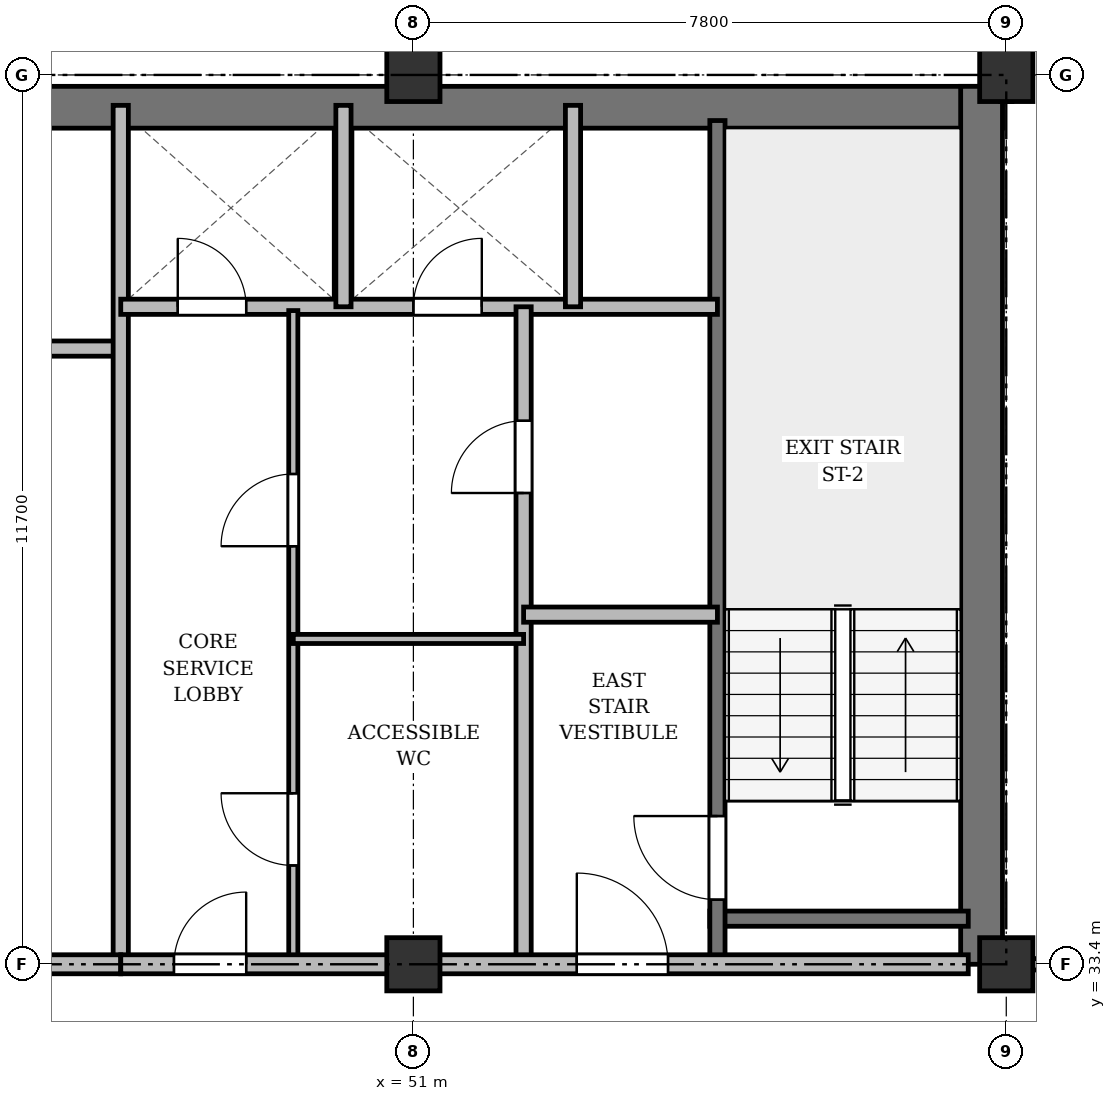
"""IFC4 building model, lengths in metres.
Left out: names, types, materials, properties, quantities, classifications, styles, units other than length and angle.
Written with IfcOpenShell. Run it as: python <this file> out.ifc"""

import sys

from ifc_helpers import new_model, si_unit, direction, frame, frame_2d, origin, origin_2d, place, context, subcontext, project, spatial, rectangle, extrude, source, transform, mapped, element, fill, save


model = new_model("IFC4")
c1 = context("Model", 3, precision=1e-05, world=origin(), true_north=direction((0.0, 1.0)))
c2 = subcontext(c1, "Body", "Model", "MODEL_VIEW")
j1 = project(units=[si_unit("LENGTHUNIT", "METRE"), si_unit("PLANEANGLEUNIT", "RADIAN")], contexts=[c1])
p1 = place(None, origin())
s1 = spatial("IfcSite", under=j1, at=p1, CompositionType="ELEMENT")
p2 = place(p1, origin())
s2 = spatial("IfcBuilding", under=s1, at=p2, CompositionType="ELEMENT")
p3 = place(p2, frame((0.0, 0.0, 201.3)))
s3 = spatial("IfcBuildingStorey", under=s2, at=p3, CompositionType="ELEMENT", Elevation=201.3)
m1 = source(origin(), c2, "Body", "SweptSolid", [
    extrude(rectangle(XDim=0.7, YDim=0.7, at=origin_2d()), origin(), (0.0, 0.0, 1.0), 3.6),
])
for number, where, z_axis, x_axis in (
    (1, (51.0, 33.4, 0.0), (0.0, 0.0, 1.0), (1.0, 0.0, 0.0)),
    (2, (51.0, 45.1, 0.0), (0.0, 0.0, 1.0), (1.0, 0.0, 0.0)),
    (3, (58.8, 33.4, 0.0), (0.0, 0.0, 1.0), (1.0, 0.0, 0.0)),
    (4, (58.8, 45.1, 0.0), (0.0, 0.0, 1.0), (1.0, 0.0, 0.0)),
):
    element("IfcColumn", number, at=place(p3, frame(where, z_axis=z_axis, x_axis=x_axis)), inside=s3, PredefinedType="COLUMN", context=c2, shape_type="MappedRepresentation", body=[
        mapped(m1, transform((0.0, 0.0, 0.0), x_axis=(1.0, 0.0, 0.0), y_axis=(0.0, 1.0, 0.0), z_axis=(0.0, 0.0, 1.0), scale=1.0)),
    ])
p4 = place(p3, frame((15.65, 44.675, 0.0), z_axis=(0.0, 0.0, 1.0), x_axis=(1.0, 0.0, 0.0)))
e5 = element("IfcWall", 5, at=p4, inside=s3, PredefinedType="SHEAR", context=c2, shape_type="SweptSolid", body=[
    extrude(rectangle(XDim=43.1, YDim=0.55, at=frame_2d((21.55, 0.0))), origin(), (0.0, 0.0, 1.0), 3.22),
])
p5 = place(p3, frame((58.475, 33.4, 0.0), z_axis=(0.0, 0.0, 1.0), x_axis=(0.0, 1.0, 0.0)))
e6 = element("IfcWall", 6, at=p5, inside=s3, PredefinedType="SHEAR", context=c2, shape_type="SweptSolid", body=[
    extrude(rectangle(XDim=11.55, YDim=0.55, at=frame_2d((5.775, 0.0))), origin(), (0.0, 0.0, 1.0), 3.22),
])
p6 = place(p3, frame((54.9, 34.0, 0.0), z_axis=(0.0, 0.0, 1.0), x_axis=(1.0, 0.0, 0.0)))
e7 = element("IfcWall", 7, at=p6, inside=s3, PredefinedType="SHEAR", context=c2, shape_type="SweptSolid", body=[
    extrude(rectangle(XDim=3.4, YDim=0.2, at=frame_2d((1.7, 0.0))), origin(), (0.0, 0.0, 1.0), 3.22),
])
p7 = place(p3, frame((55.0, 33.4, 0.0), z_axis=(0.0, 0.0, 1.0), x_axis=(0.0, 1.0, 0.0)))
e8 = element("IfcWall", 8, at=p7, inside=s3, PredefinedType="SHEAR", context=c2, shape_type="SweptSolid", body=[
    extrude(rectangle(XDim=11.1, YDim=0.2, at=frame_2d((5.55, 0.0))), origin(), (0.0, 0.0, 1.0), 3.22),
])
p8 = place(p7, frame((0.85, 0.0, 0.0)))
e9 = element("IfcOpeningElement", 9, at=p8, cuts=e8, PredefinedType="OPENING", context=c2, shape_type="SweptSolid", body=[
    extrude(rectangle(XDim=1.1, YDim=2.15, at=frame_2d((0.55, 1.075))), frame((0.0, 0.11, 0.0), z_axis=(0.0, -1.0, 0.0), x_axis=(1.0, 0.0, 0.0)), (0.0, 0.0, 1.0), 0.22),
])
p9 = place(p3, frame((40.25, 41.5, 0.0), z_axis=(0.0, 0.0, 1.0), x_axis=(1.0, 0.0, 0.0)))
e10 = element("IfcWall", 10, at=p9, inside=s3, PredefinedType="SOLIDWALL", context=c2, shape_type="SweptSolid", body=[
    extrude(rectangle(XDim=6.9, YDim=0.2, at=frame_2d((3.45, 0.0))), origin(), (0.0, 0.0, 1.0), 2.72),
])
p10 = place(p3, frame((47.15, 33.4, 0.0), z_axis=(0.0, 0.0, 1.0), x_axis=(0.0, 1.0, 0.0)))
e11 = element("IfcWall", 11, at=p10, inside=s3, PredefinedType="SOLIDWALL", context=c2, shape_type="SweptSolid", body=[
    extrude(rectangle(XDim=11.3, YDim=0.2, at=frame_2d((5.65, 0.0))), origin(), (0.0, 0.0, 1.0), 2.77),
])
p11 = place(p3, frame((33.3, 33.4, 0.0), z_axis=(0.0, 0.0, 1.0), x_axis=(1.0, 0.0, 0.0)))
e12 = element("IfcWall", 12, at=p11, inside=s3, PredefinedType="PARTITIONING", context=c2, shape_type="SweptSolid", body=[
    extrude(rectangle(XDim=13.85, YDim=0.25, at=frame_2d((6.925, 0.0))), origin(), (0.0, 0.0, 1.0), 2.77),
])
p12 = place(p11, frame((4.2, 0.0, 0.0)))
e13 = element("IfcOpeningElement", 13, at=p12, cuts=e12, PredefinedType="OPENING", context=c2, shape_type="SweptSolid", body=[
    extrude(rectangle(XDim=1.6, YDim=2.2, at=frame_2d((0.8, 1.1))), frame((0.0, 0.135, 0.0), z_axis=(0.0, -1.0, 0.0), x_axis=(1.0, 0.0, 0.0)), (0.0, 0.0, 1.0), 0.27),
])
p13 = place(p3, frame((47.15, 42.05, 0.0), z_axis=(0.0, 0.0, 1.0), x_axis=(1.0, 0.0, 0.0)))
e14 = element("IfcWall", 14, at=p13, inside=s3, PredefinedType="SOLIDWALL", context=c2, shape_type="SweptSolid", body=[
    extrude(rectangle(XDim=7.85, YDim=0.2, at=frame_2d((3.925, 0.0))), origin(), (0.0, 0.0, 1.0), 2.72),
])
p14 = place(p13, frame((0.75, 0.0, 0.0)))
e15 = element("IfcOpeningElement", 15, at=p14, cuts=e14, PredefinedType="OPENING", context=c2, shape_type="SweptSolid", body=[
    extrude(rectangle(XDim=0.9, YDim=2.1, at=frame_2d((0.45, 1.05))), frame((0.0, 0.11, 0.0), z_axis=(0.0, -1.0, 0.0), x_axis=(1.0, 0.0, 0.0)), (0.0, 0.0, 1.0), 0.22),
])
p15 = place(p13, frame((3.85, 0.0, 0.0)))
e16 = element("IfcOpeningElement", 16, at=p15, cuts=e14, PredefinedType="OPENING", context=c2, shape_type="SweptSolid", body=[
    extrude(rectangle(XDim=0.9, YDim=2.1, at=frame_2d((0.45, 1.05))), frame((0.0, 0.11, 0.0), z_axis=(0.0, -1.0, 0.0), x_axis=(1.0, 0.0, 0.0)), (0.0, 0.0, 1.0), 0.22),
])
for number, where, z_axis, x_axis in (
    (17, (50.08, 42.05, 0.0), (0.0, 0.0, 1.0), (0.0, 1.0, 0.0)),
    (18, (53.1, 42.05, 0.0), (0.0, 0.0, 1.0), (0.0, 1.0, 0.0)),
):
    element("IfcWall", number, at=place(p3, frame(where, z_axis=z_axis, x_axis=x_axis)), inside=s3, PredefinedType="SOLIDWALL", context=c2, shape_type="SweptSolid", body=[
        extrude(rectangle(XDim=2.65, YDim=0.2, at=frame_2d((1.325, 0.0))), origin(), (0.0, 0.0, 1.0), 3.22),
    ])
p16 = place(p3, frame((52.45, 33.4, 0.0), z_axis=(0.0, 0.0, 1.0), x_axis=(0.0, 1.0, 0.0)))
e19 = element("IfcWall", 19, at=p16, inside=s3, PredefinedType="PARTITIONING", context=c2, shape_type="SweptSolid", body=[
    extrude(rectangle(XDim=8.65, YDim=0.2, at=frame_2d((4.325, 0.0))), origin(), (0.0, 0.0, 1.0), 2.77),
])
p17 = place(p16, frame((6.2, 0.0, 0.0)))
e20 = element("IfcOpeningElement", 20, at=p17, cuts=e19, PredefinedType="OPENING", context=c2, shape_type="SweptSolid", body=[
    extrude(rectangle(XDim=0.95, YDim=2.15, at=frame_2d((0.475, 1.075))), frame((0.0, 0.11, 0.0), z_axis=(0.0, -1.0, 0.0), x_axis=(1.0, 0.0, 0.0)), (0.0, 0.0, 1.0), 0.22),
])
p18 = place(p3, frame((52.45, 38.0, 0.0), z_axis=(0.0, 0.0, 1.0), x_axis=(1.0, 0.0, 0.0)))
e21 = element("IfcWall", 21, at=p18, inside=s3, PredefinedType="PARTITIONING", context=c2, shape_type="SweptSolid", body=[
    extrude(rectangle(XDim=2.55, YDim=0.2, at=frame_2d((1.275, 0.0))), origin(), (0.0, 0.0, 1.0), 3.22),
])
p19 = place(p3, frame((49.42, 33.4, 0.0), z_axis=(0.0, 0.0, 1.0), x_axis=(0.0, 1.0, 0.0)))
e22 = element("IfcWall", 22, at=p19, inside=s3, PredefinedType="PARTITIONING", context=c2, shape_type="SweptSolid", body=[
    extrude(rectangle(XDim=8.6, YDim=0.12, at=frame_2d((4.3, 0.0))), origin(), (0.0, 0.0, 1.0), 2.77),
])
p20 = place(p19, frame((1.3, 0.0, 0.0)))
e23 = element("IfcOpeningElement", 23, at=p20, cuts=e22, PredefinedType="OPENING", context=c2, shape_type="SweptSolid", body=[
    extrude(rectangle(XDim=0.95, YDim=2.15, at=frame_2d((0.475, 1.075))), frame((0.0, 0.07, 0.0), z_axis=(0.0, -1.0, 0.0), x_axis=(1.0, 0.0, 0.0)), (0.0, 0.0, 1.0), 0.14),
])
p21 = place(p19, frame((5.5, 0.0, 0.0)))
e24 = element("IfcOpeningElement", 24, at=p21, cuts=e22, PredefinedType="OPENING", context=c2, shape_type="SweptSolid", body=[
    extrude(rectangle(XDim=0.95, YDim=2.15, at=frame_2d((0.475, 1.075))), frame((0.0, 0.07, 0.0), z_axis=(0.0, -1.0, 0.0), x_axis=(1.0, 0.0, 0.0)), (0.0, 0.0, 1.0), 0.14),
])
p22 = place(p3, frame((49.42, 37.68, 0.0), z_axis=(0.0, 0.0, 1.0), x_axis=(1.0, 0.0, 0.0)))
e25 = element("IfcWall", 25, at=p22, inside=s3, PredefinedType="PARTITIONING", context=c2, shape_type="SweptSolid", body=[
    extrude(rectangle(XDim=3.03, YDim=0.12, at=frame_2d((1.515, 0.0))), origin(), (0.0, 0.0, 1.0), 2.72),
])
p23 = place(p3, frame((47.15, 33.4, 0.0), z_axis=(0.0, 0.0, 1.0), x_axis=(1.0, 0.0, 0.0)))
e26 = element("IfcWall", 26, at=p23, inside=s3, PredefinedType="PARTITIONING", context=c2, shape_type="SweptSolid", body=[
    extrude(rectangle(XDim=11.15, YDim=0.25, at=frame_2d((5.575, 0.0))), origin(), (0.0, 0.0, 1.0), 2.77),
])
p24 = place(p23, frame((0.7, 0.0, 0.0)))
e27 = element("IfcOpeningElement", 27, at=p24, cuts=e26, PredefinedType="OPENING", context=c2, shape_type="SweptSolid", body=[
    extrude(rectangle(XDim=0.95, YDim=2.15, at=frame_2d((0.475, 1.075))), frame((0.0, 0.135, 0.0), z_axis=(0.0, -1.0, 0.0), x_axis=(1.0, 0.0, 0.0)), (0.0, 0.0, 1.0), 0.27),
])
p25 = place(p23, frame((6.0, 0.0, 0.0)))
e28 = element("IfcOpeningElement", 28, at=p25, cuts=e26, PredefinedType="OPENING", context=c2, shape_type="SweptSolid", body=[
    extrude(rectangle(XDim=1.2, YDim=2.15, at=frame_2d((0.6, 1.075))), frame((0.0, 0.135, 0.0), z_axis=(0.0, -1.0, 0.0), x_axis=(1.0, 0.0, 0.0)), (0.0, 0.0, 1.0), 0.27),
])
p26 = place(p3, frame((58.8, 33.4, 0.0), z_axis=(0.0, 0.0, 1.0), x_axis=(1.0, 0.0, 0.0)))
e29 = element("IfcWall", 29, at=p26, inside=s3, PredefinedType="PARTITIONING", context=c2, shape_type="SweptSolid", body=[
    extrude(rectangle(XDim=7.35, YDim=0.15, at=frame_2d((3.675, 0.0))), origin(), (0.0, 0.0, 1.0), 2.77),
])
p27 = place(p26, frame((3.192, 0.0, 0.0)))
e30 = element("IfcOpeningElement", 30, at=p27, cuts=e29, PredefinedType="OPENING", context=c2, shape_type="SweptSolid", body=[
    extrude(rectangle(XDim=0.95, YDim=2.15, at=frame_2d((0.475, 1.075))), frame((0.0, 0.085, 0.0), z_axis=(0.0, -1.0, 0.0), x_axis=(1.0, 0.0, 0.0)), (0.0, 0.0, 1.0), 0.17),
])
p28 = place(p3, frame((58.8, 44.75, 0.0), z_axis=(0.0, 0.0, 1.0), x_axis=(0.0, 1.0, 0.0)))
e31 = element("IfcWall", 31, at=p28, inside=s3, PredefinedType="PARTITIONING", context=c2, shape_type="SweptSolid", body=[
    extrude(rectangle(XDim=3.61, YDim=0.15, at=frame_2d((1.805, 0.0))), origin(), (0.0, 0.0, 1.0), 2.72),
])
p29 = place(p28, frame((1.1, 0.0, 0.0)))
e32 = element("IfcOpeningElement", 32, at=p29, cuts=e31, PredefinedType="OPENING", context=c2, shape_type="SweptSolid", body=[
    extrude(rectangle(XDim=0.95, YDim=2.15, at=frame_2d((0.475, 1.075))), frame((0.0, 0.085, 0.0), z_axis=(0.0, -1.0, 0.0), x_axis=(1.0, 0.0, 0.0)), (0.0, 0.0, 1.0), 0.17),
])
m2 = source(origin(), c2, "Body", "SweptSolid", [
    extrude(rectangle(XDim=1.1, YDim=2.15, at=frame_2d((0.55, 1.075))), frame((0.0, 0.025, 0.0), z_axis=(0.0, -1.0, 0.0), x_axis=(1.0, 0.0, 0.0)), (0.0, 0.0, 1.0), 0.05),
])
p30 = place(p8, origin())
e33 = element("IfcDoor", 33, at=p30, inside=s3, OperationType="SINGLE_SWING_RIGHT", PredefinedType="DOOR", context=c2, shape_type="MappedRepresentation", body=[
    mapped(m2, transform((0.0, 0.0, 0.0), x_axis=(1.0, 0.0, 0.0), y_axis=(0.0, 1.0, 0.0), z_axis=(0.0, 0.0, 1.0), scale=1.0)),
])
fill(e9, e33)
m3 = source(origin(), c2, "Body", "SweptSolid", [
    extrude(rectangle(XDim=0.9, YDim=2.1, at=frame_2d((0.45, 1.05))), frame((0.0, 0.025, 0.0), z_axis=(0.0, -1.0, 0.0), x_axis=(1.0, 0.0, 0.0)), (0.0, 0.0, 1.0), 0.05),
])
p31 = place(p14, origin())
e34 = element("IfcDoor", 34, at=p31, inside=s3, OperationType="SINGLE_SWING_LEFT", PredefinedType="DOOR", context=c2, shape_type="MappedRepresentation", body=[
    mapped(m3, transform((0.0, 0.0, 0.0), x_axis=(1.0, 0.0, 0.0), y_axis=(0.0, 1.0, 0.0), z_axis=(0.0, 0.0, 1.0), scale=1.0)),
])
fill(e15, e34)
p32 = place(p15, origin())
e35 = element("IfcDoor", 35, at=p32, inside=s3, OperationType="SINGLE_SWING_RIGHT", PredefinedType="DOOR", context=c2, shape_type="MappedRepresentation", body=[
    mapped(m3, transform((0.0, 0.0, 0.0), x_axis=(1.0, 0.0, 0.0), y_axis=(0.0, 1.0, 0.0), z_axis=(0.0, 0.0, 1.0), scale=1.0)),
])
fill(e16, e35)
m4 = source(origin(), c2, "Body", "SweptSolid", [
    extrude(rectangle(XDim=0.95, YDim=2.15, at=frame_2d((0.475, 1.075))), frame((0.0, 0.025, 0.0), z_axis=(0.0, -1.0, 0.0), x_axis=(1.0, 0.0, 0.0)), (0.0, 0.0, 1.0), 0.05),
])
p33 = place(p17, origin())
e36 = element("IfcDoor", 36, at=p33, inside=s3, OperationType="SINGLE_SWING_LEFT", PredefinedType="DOOR", context=c2, shape_type="MappedRepresentation", body=[
    mapped(m4, transform((0.0, 0.0, 0.0), x_axis=(1.0, 0.0, 0.0), y_axis=(0.0, 1.0, 0.0), z_axis=(0.0, 0.0, 1.0), scale=1.0)),
])
fill(e20, e36)
p34 = place(p20, origin())
e37 = element("IfcDoor", 37, at=p34, inside=s3, OperationType="SINGLE_SWING_RIGHT", PredefinedType="DOOR", context=c2, shape_type="MappedRepresentation", body=[
    mapped(m4, transform((0.0, 0.0, 0.0), x_axis=(1.0, 0.0, 0.0), y_axis=(0.0, 1.0, 0.0), z_axis=(0.0, 0.0, 1.0), scale=1.0)),
])
fill(e23, e37)
p35 = place(p21, origin())
e38 = element("IfcDoor", 38, at=p35, inside=s3, OperationType="SINGLE_SWING_LEFT", PredefinedType="DOOR", context=c2, shape_type="MappedRepresentation", body=[
    mapped(m4, transform((0.0, 0.0, 0.0), x_axis=(1.0, 0.0, 0.0), y_axis=(0.0, 1.0, 0.0), z_axis=(0.0, 0.0, 1.0), scale=1.0)),
])
fill(e24, e38)
p36 = place(p24, origin())
e39 = element("IfcDoor", 39, at=p36, inside=s3, OperationType="SINGLE_SWING_RIGHT", PredefinedType="DOOR", context=c2, shape_type="MappedRepresentation", body=[
    mapped(m4, transform((0.0, 0.0, 0.0), x_axis=(1.0, 0.0, 0.0), y_axis=(0.0, 1.0, 0.0), z_axis=(0.0, 0.0, 1.0), scale=1.0)),
])
fill(e27, e39)
m5 = source(origin(), c2, "Body", "SweptSolid", [
    extrude(rectangle(XDim=1.2, YDim=2.15, at=frame_2d((0.6, 1.075))), frame((0.0, 0.025, 0.0), z_axis=(0.0, -1.0, 0.0), x_axis=(1.0, 0.0, 0.0)), (0.0, 0.0, 1.0), 0.05),
])
p37 = place(p25, origin())
e40 = element("IfcDoor", 40, at=p37, inside=s3, OperationType="SINGLE_SWING_LEFT", PredefinedType="DOOR", context=c2, shape_type="MappedRepresentation", body=[
    mapped(m5, transform((0.0, 0.0, 0.0), x_axis=(1.0, 0.0, 0.0), y_axis=(0.0, 1.0, 0.0), z_axis=(0.0, 0.0, 1.0), scale=1.0)),
])
fill(e28, e40)
save(model, sys.argv[1])
